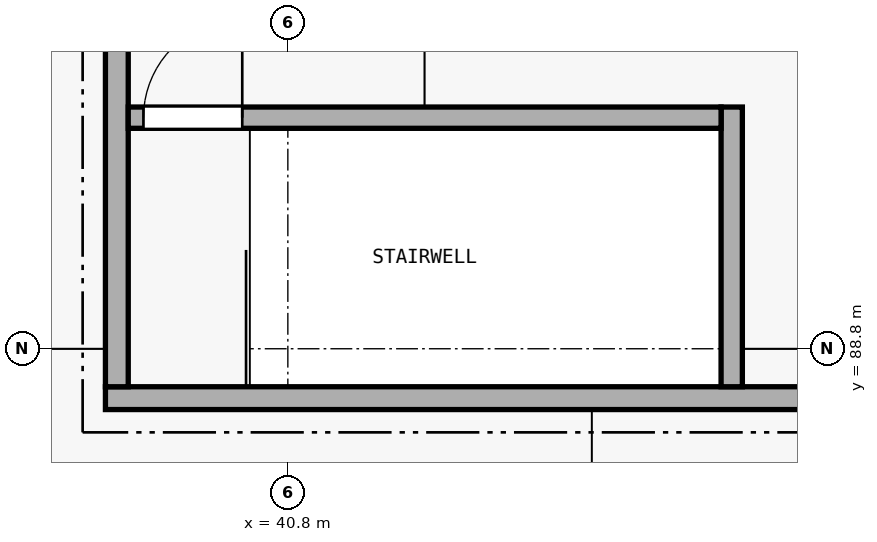
"""IFC4 building model, lengths in metres.
Left out: names, types, materials, properties, quantities, classifications, styles, units other than length and angle.
Written with IfcOpenShell. Run it as: python <this file> out.ifc"""

import sys

from ifc_helpers import new_model, si_unit, direction, frame, frame_2d, origin, place, context, subcontext, project, spatial, rectangle, extrude, element, fill, save


model = new_model("IFC4")
c1 = context("Model", 3, precision=1e-05, world=origin(), true_north=direction((0.0, 1.0)))
c2 = subcontext(c1, "Body", "Model", "MODEL_VIEW")
j1 = project(units=[si_unit("LENGTHUNIT", "METRE"), si_unit("PLANEANGLEUNIT", "RADIAN")], contexts=[c1])
p1 = place(None, origin())
s1 = spatial("IfcSite", under=j1, at=p1, CompositionType="ELEMENT")
p2 = place(p1, origin())
s2 = spatial("IfcBuilding", under=s1, at=p2, CompositionType="ELEMENT")
p3 = place(p2, frame((0.0, 0.0, 5.4)))
s3 = spatial("IfcBuildingStorey", under=s2, at=p3, CompositionType="ELEMENT", Elevation=5.4)
p4 = place(p3, frame((38.4, 88.15, 0.0), z_axis=(0.0, 0.0, 1.0), x_axis=(1.0, 0.0, 0.0)))
e1 = element("IfcWall", 1, at=p4, inside=s3, PredefinedType="SHEAR", context=c2, shape_type="SweptSolid", body=[
    extrude(rectangle(XDim=16.0, YDim=0.3, at=frame_2d((8.0, 0.0))), origin(), (0.0, 0.0, 1.0), 4.495),
])
p5 = place(p3, frame((38.55, 88.3, 0.0), z_axis=(0.0, 0.0, 1.0), x_axis=(0.0, 1.0, 0.0)))
e2 = element("IfcWall", 2, at=p5, inside=s3, PredefinedType="SHEAR", context=c2, shape_type="SweptSolid", body=[
    extrude(rectangle(XDim=5.8, YDim=0.3, at=frame_2d((2.9, 0.0))), origin(), (0.0, 0.0, 1.0), 4.495),
])
p6 = place(p3, frame((46.64, 88.3, 0.0), z_axis=(0.0, 0.0, 1.0), x_axis=(0.0, 1.0, 0.0)))
e3 = element("IfcWall", 3, at=p6, inside=s3, PredefinedType="SHEAR", context=c2, shape_type="SweptSolid", body=[
    extrude(rectangle(XDim=3.68, YDim=0.28, at=frame_2d((1.84, 0.0))), origin(), (0.0, 0.0, 1.0), 4.495),
])
p7 = place(p3, frame((38.7, 91.84, 0.0), z_axis=(0.0, 0.0, 1.0), x_axis=(1.0, 0.0, 0.0)))
e4 = element("IfcWall", 4, at=p7, inside=s3, PredefinedType="SHEAR", context=c2, shape_type="SweptSolid", body=[
    extrude(rectangle(XDim=7.8, YDim=0.28, at=frame_2d((3.9, 0.0))), origin(), (0.0, 0.0, 1.0), 4.495),
])
p8 = place(p7, frame((0.2, 0.0, 0.0)))
e5 = element("IfcOpeningElement", 5, at=p8, cuts=e4, PredefinedType="OPENING", context=c2, shape_type="SweptSolid", body=[
    extrude(rectangle(XDim=1.3, YDim=2.2, at=frame_2d((0.65, 1.1))), frame((0.0, 0.15, 0.0), z_axis=(0.0, -1.0, 0.0), x_axis=(1.0, 0.0, 0.0)), (0.0, 0.0, 1.0), 0.3),
])
p9 = place(p8, origin())
e6 = element("IfcDoor", 6, at=p9, inside=s3, OperationType="SINGLE_SWING_RIGHT", PredefinedType="DOOR", context=c2, shape_type="SweptSolid", body=[
    extrude(rectangle(XDim=1.3, YDim=2.2, at=frame_2d((0.65, 1.1))), frame((0.0, 0.025, 0.0), z_axis=(0.0, -1.0, 0.0), x_axis=(1.0, 0.0, 0.0)), (0.0, 0.0, 1.0), 0.05),
])
fill(e5, e6)
save(model, sys.argv[1])
